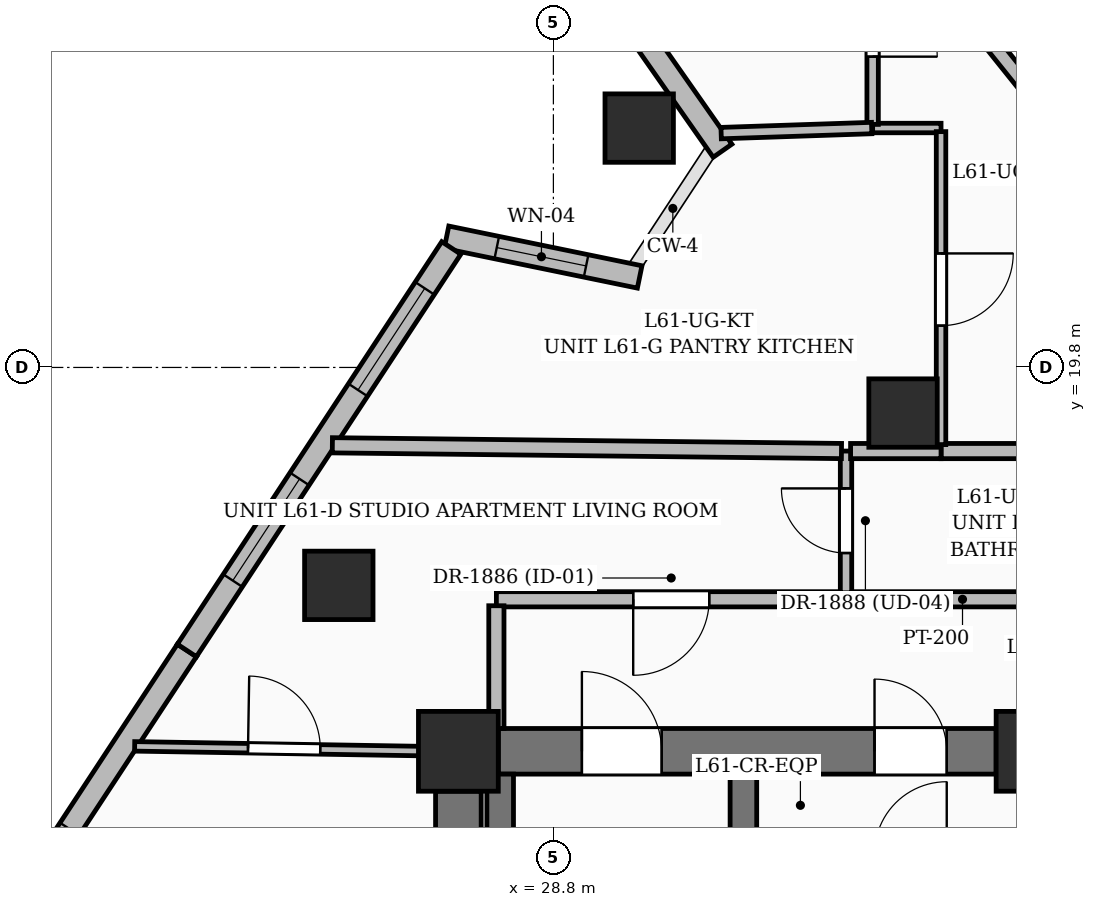
"""IFC4 building model, lengths in metres.
Left out: names, types, materials, properties, quantities, classifications, styles, units other than length and angle.
Written with IfcOpenShell. Run it as: python <this file> out.ifc"""

import sys

from ifc_helpers import new_model, si_unit, direction, frame, frame_2d, origin, origin_2d, place, context, subcontext, project, spatial, rectangle, extrude, element, fill, save


model = new_model("IFC4")
c1 = context("Model", 3, precision=1e-05, world=origin(), true_north=direction((0.0, 1.0)))
c2 = subcontext(c1, "Body", "Model", "MODEL_VIEW")
j1 = project(units=[si_unit("LENGTHUNIT", "METRE"), si_unit("PLANEANGLEUNIT", "RADIAN")], contexts=[c1])
p1 = place(None, origin())
s1 = spatial("IfcSite", under=j1, at=p1, CompositionType="ELEMENT")
p2 = place(p1, origin())
s2 = spatial("IfcBuilding", under=s1, at=p2, CompositionType="ELEMENT")
p3 = place(p2, frame((0.0, 0.0, 237.0)))
s3 = spatial("IfcBuildingStorey", under=s2, at=p3, CompositionType="ELEMENT", Elevation=237.0)
for number, where, z_axis, x_axis in (
    (1, (27.55, 14.75, 0.0), (0.0, 0.0, 1.0), (1.0, 0.0, 0.0)),
    (2, (35.15, 14.75, 0.0), (0.0, 0.0, 1.0), (1.0, 0.0, 0.0)),
):
    element("IfcColumn", number, at=place(p3, frame(where, z_axis=z_axis, x_axis=x_axis)), inside=s3, PredefinedType="COLUMN", context=c2, shape_type="SweptSolid", body=[
        extrude(rectangle(XDim=1.05, YDim=1.05, at=origin_2d()), origin(), (0.0, 0.0, 1.0), 3.75),
    ])
p4 = place(p3, frame((33.4, 19.2, 0.0), z_axis=(0.0, 0.0, 1.0), x_axis=(1.0, 0.0, 0.0)))
e3 = element("IfcColumn", 3, at=p4, inside=s3, PredefinedType="COLUMN", context=c2, shape_type="SweptSolid", body=[
    extrude(rectangle(XDim=0.9, YDim=0.9, at=origin_2d()), origin(), (0.0, 0.0, 1.0), 3.75),
])
p5 = place(p3, frame((28.075, 14.75, 0.0), z_axis=(0.0, 0.0, 1.0), x_axis=(1.0, 0.0, 0.0)))
e4 = element("IfcWall", 4, at=p5, inside=s3, PredefinedType="SHEAR", context=c2, shape_type="SweptSolid", body=[
    extrude(rectangle(XDim=6.55, YDim=0.6, at=frame_2d((3.275, 0.0))), origin(), (0.0, 0.0, 1.0), 3.75),
])
p6 = place(p5, frame((1.1, 0.0, 0.0)))
e5 = element("IfcOpeningElement", 5, at=p6, cuts=e4, PredefinedType="OPENING", context=c2, shape_type="SweptSolid", body=[
    extrude(rectangle(XDim=1.05, YDim=2.15, at=frame_2d((0.525, 1.075))), frame((0.0, 0.31, 0.0), z_axis=(0.0, -1.0, 0.0), x_axis=(1.0, 0.0, 0.0)), (0.0, 0.0, 1.0), 0.62),
])
p7 = place(p5, frame((4.95, 0.0, 0.0)))
e6 = element("IfcOpeningElement", 6, at=p7, cuts=e4, PredefinedType="OPENING", context=c2, shape_type="SweptSolid", body=[
    extrude(rectangle(XDim=0.95, YDim=2.15, at=frame_2d((0.475, 1.075))), frame((0.0, 0.31, 0.0), z_axis=(0.0, -1.0, 0.0), x_axis=(1.0, 0.0, 0.0)), (0.0, 0.0, 1.0), 0.62),
])
p8 = place(p3, frame((27.55, 5.075, 0.0), z_axis=(0.0, 0.0, 1.0), x_axis=(0.0, 1.0, 0.0)))
e7 = element("IfcWall", 7, at=p8, inside=s3, PredefinedType="SHEAR", context=c2, shape_type="SweptSolid", body=[
    extrude(rectangle(XDim=9.15, YDim=0.6, at=frame_2d((4.575, 0.0))), origin(), (0.0, 0.0, 1.0), 3.75),
])
p9 = place(p3, frame((28.1, 5.2, 0.0), z_axis=(0.0, 0.0, 1.0), x_axis=(0.0, 1.0, 0.0)))
e8 = element("IfcWall", 8, at=p9, inside=s3, PredefinedType="SOLIDWALL", context=c2, shape_type="SweptSolid", body=[
    extrude(rectangle(XDim=9.25, YDim=0.35, at=frame_2d((4.625, 0.0))), origin(), (0.0, 0.0, 1.0), 3.75),
])
p10 = place(p3, frame((31.3, 5.2, 0.0), z_axis=(0.0, 0.0, 1.0), x_axis=(0.0, 1.0, 0.0)))
e9 = element("IfcWall", 9, at=p10, inside=s3, PredefinedType="SOLIDWALL", context=c2, shape_type="SweptSolid", body=[
    extrude(rectangle(XDim=9.25, YDim=0.35, at=frame_2d((4.625, 0.0))), origin(), (0.0, 0.0, 1.0), 3.75),
])
p11 = place(p10, frame((6.02, 0.0, 0.0)))
e10 = element("IfcOpeningElement", 10, at=p11, cuts=e9, PredefinedType="OPENING", context=c2, shape_type="SweptSolid", body=[
    extrude(rectangle(XDim=1.0, YDim=2.15, at=frame_2d((0.5, 1.075))), frame((0.0, 0.185, 0.0), z_axis=(0.0, -1.0, 0.0), x_axis=(1.0, 0.0, 0.0)), (0.0, 0.0, 1.0), 0.37),
])
for number, where, z_axis, x_axis in (
    (11, (29.929, 22.949, 0.0), (0.0, 0.0, 1.0), (1.0, 0.0, 0.0)),
    (12, (25.977, 16.933, 0.0), (0.0, 0.0, 1.0), (1.0, 0.0, 0.0)),
):
    element("IfcColumn", number, at=place(p3, frame(where, z_axis=z_axis, x_axis=x_axis)), inside=s3, PredefinedType="COLUMN", context=c2, shape_type="SweptSolid", body=[
        extrude(rectangle(XDim=0.9, YDim=0.9, at=origin_2d()), origin(), (0.0, 0.0, 1.0), 3.75),
    ])
p12 = place(p3, frame((27.394, 21.513, 0.0), z_axis=(0.0, 0.0, 1.0), x_axis=(0.979513310411, -0.201379429751, 0.0)))
e13 = element("IfcWall", 13, at=p12, inside=s3, PredefinedType="SOLIDWALL", context=c2, shape_type="SweptSolid", body=[
    extrude(rectangle(XDim=2.594, YDim=0.3, at=frame_2d((1.297, 0.0))), origin(), (0.0, 0.0, 1.0), 2.825),
])
p13 = place(p12, frame((0.675, 0.0, 0.8)))
e14 = element("IfcOpeningElement", 14, at=p13, cuts=e13, PredefinedType="OPENING", context=c2, shape_type="SweptSolid", body=[
    extrude(rectangle(XDim=1.2, YDim=1.8, at=frame_2d((0.6, 0.9))), frame((0.0, 0.16, 0.0), z_axis=(0.0, -1.0, 0.0), x_axis=(1.0, 0.0, 0.0)), (0.0, 0.0, 1.0), 0.32),
])
p14 = place(p3, frame((31.025, 22.651, 0.0), z_axis=(0.0, 0.0, 1.0), x_axis=(-0.573670817112, 0.819085950065, 0.0)))
e15 = element("IfcWall", 15, at=p14, inside=s3, PredefinedType="SOLIDWALL", context=c2, shape_type="SweptSolid", body=[
    extrude(rectangle(XDim=2.594, YDim=0.3, at=frame_2d((1.297, 0.0))), origin(), (0.0, 0.0, 1.0), 2.825),
])
p15 = place(p3, frame((20.349, 10.551, 0.0), z_axis=(0.0, 0.0, 1.0), x_axis=(0.549037128291, 0.835797961087, 0.0)))
e16 = element("IfcWall", 16, at=p15, inside=s3, PredefinedType="SOLIDWALL", context=c2, shape_type="SweptSolid", body=[
    extrude(rectangle(XDim=6.611, YDim=0.3, at=frame_2d((3.305, 0.0))), origin(), (0.0, 0.0, 1.0), 3.5),
])
p16 = place(p15, frame((2.0, 0.0, 0.6)))
e17 = element("IfcOpeningElement", 17, at=p16, cuts=e16, PredefinedType="OPENING", context=c2, shape_type="SweptSolid", body=[
    extrude(rectangle(XDim=1.8, YDim=2.1, at=frame_2d((0.9, 1.05))), frame((0.0, 0.16, 0.0), z_axis=(0.0, -1.0, 0.0), x_axis=(1.0, 0.0, 0.0)), (0.0, 0.0, 1.0), 0.32),
])
p17 = place(p3, frame((23.978, 16.077, 0.0), z_axis=(0.0, 0.0, 1.0), x_axis=(0.549014101099, 0.835813087236, 0.0)))
e18 = element("IfcWall", 18, at=p17, inside=s3, PredefinedType="SOLIDWALL", context=c2, shape_type="SweptSolid", body=[
    extrude(rectangle(XDim=6.336, YDim=0.3, at=frame_2d((3.168, 0.0))), origin(), (0.0, 0.0, 1.0), 3.5),
])
p18 = place(p17, frame((1.1, 0.0, 0.55)))
e19 = element("IfcOpeningElement", 19, at=p18, cuts=e18, PredefinedType="OPENING", context=c2, shape_type="SweptSolid", body=[
    extrude(rectangle(XDim=1.6, YDim=2.2, at=frame_2d((0.8, 1.1))), frame((0.0, 0.16, 0.0), z_axis=(0.0, -1.0, 0.0), x_axis=(1.0, 0.0, 0.0)), (0.0, 0.0, 1.0), 0.32),
])
p19 = place(p17, frame((4.1, 0.0, 0.55)))
e20 = element("IfcOpeningElement", 20, at=p19, cuts=e18, PredefinedType="OPENING", context=c2, shape_type="SweptSolid", body=[
    extrude(rectangle(XDim=1.6, YDim=2.2, at=frame_2d((0.8, 1.1))), frame((0.0, 0.16, 0.0), z_axis=(0.0, -1.0, 0.0), x_axis=(1.0, 0.0, 0.0)), (0.0, 0.0, 1.0), 0.32),
])
p20 = place(p3, frame((34.72, 14.75, 0.0), z_axis=(0.0, 0.0, 1.0), x_axis=(1.0, 0.0, 0.0)))
e21 = element("IfcWall", 21, at=p20, inside=s3, PredefinedType="PARTITIONING", context=c2, shape_type="SweptSolid", body=[
    extrude(rectangle(XDim=1.03, YDim=0.2, at=frame_2d((0.515, 0.0))), origin(), (0.0, 0.0, 1.0), 2.685),
])
p21 = place(p3, frame((32.65, 16.75, 0.0), z_axis=(0.0, 0.0, 1.0), x_axis=(-1.0, 0.0, 0.0)))
e22 = element("IfcWall", 22, at=p21, inside=s3, PredefinedType="PARTITIONING", context=c2, shape_type="SweptSolid", body=[
    extrude(rectangle(XDim=4.6, YDim=0.2, at=frame_2d((2.3, 0.0))), origin(), (0.0, 0.0, 1.0), 3.16),
])
p22 = place(p21, frame((1.8, 0.0, 0.0)))
e23 = element("IfcOpeningElement", 23, at=p22, cuts=e22, PredefinedType="OPENING", context=c2, shape_type="SweptSolid", body=[
    extrude(rectangle(XDim=1.0, YDim=2.2, at=frame_2d((0.5, 1.1))), frame((0.0, 0.11, 0.0), z_axis=(0.0, -1.0, 0.0), x_axis=(1.0, 0.0, 0.0)), (0.0, 0.0, 1.0), 0.22),
])
p23 = place(p3, frame((28.05, 16.665, 0.0), z_axis=(0.0, 0.0, 1.0), x_axis=(0.0, -1.0, 0.0)))
e24 = element("IfcWall", 24, at=p23, inside=s3, PredefinedType="PARTITIONING", context=c2, shape_type="SweptSolid", body=[
    extrude(rectangle(XDim=1.615, YDim=0.2, at=frame_2d((0.808, 0.0))), origin(), (0.0, 0.0, 1.0), 3.16),
])
p24 = place(p3, frame((35.715, 16.75, 0.0), z_axis=(0.0, 0.0, 1.0), x_axis=(-1.0, 0.0, 0.0)))
e25 = element("IfcWall", 25, at=p24, inside=s3, PredefinedType="PARTITIONING", context=c2, shape_type="SweptSolid", body=[
    extrude(rectangle(XDim=3.065, YDim=0.2, at=frame_2d((1.533, 0.0))), origin(), (0.0, 0.0, 1.0), 2.685),
])
p25 = place(p3, frame((23.291, 14.815, 0.0), z_axis=(0.0, 0.0, 1.0), x_axis=(0.999865488885, -0.016401345587, 0.0)))
e26 = element("IfcWall", 26, at=p25, inside=s3, PredefinedType="PARTITIONING", context=c2, shape_type="SweptSolid", body=[
    extrude(rectangle(XDim=3.959, YDim=0.125, at=frame_2d((1.98, 0.0))), origin(), (0.0, 0.0, 1.0), 2.82),
])
p26 = place(p25, frame((1.492, 0.0, 0.0)))
e27 = element("IfcOpeningElement", 27, at=p26, cuts=e26, PredefinedType="OPENING", context=c2, shape_type="SweptSolid", body=[
    extrude(rectangle(XDim=0.95, YDim=2.2, at=frame_2d((0.475, 1.1))), frame((0.0, 0.072, 0.0), z_axis=(0.0, -1.0, 0.0), x_axis=(1.0, 0.0, 0.0)), (0.0, 0.0, 1.0), 0.145),
])
p27 = place(p3, frame((32.65, 16.835, 0.0), z_axis=(0.0, 0.0, 1.0), x_axis=(0.0, 1.0, 0.0)))
e28 = element("IfcWall", 28, at=p27, inside=s3, PredefinedType="PARTITIONING", context=c2, shape_type="SweptSolid", body=[
    extrude(rectangle(XDim=1.865, YDim=0.15, at=frame_2d((0.933, 0.0))), origin(), (0.0, 0.0, 1.0), 3.5),
])
p28 = place(p27, frame((0.524, 0.0, 0.0)))
e29 = element("IfcOpeningElement", 29, at=p28, cuts=e28, PredefinedType="OPENING", context=c2, shape_type="SweptSolid", body=[
    extrude(rectangle(XDim=0.85, YDim=2.1, at=frame_2d((0.425, 1.05))), frame((0.0, 0.085, 0.0), z_axis=(0.0, -1.0, 0.0), x_axis=(1.0, 0.0, 0.0)), (0.0, 0.0, 1.0), 0.17),
])
p29 = place(p3, frame((32.59, 18.7, 0.0), z_axis=(0.0, 0.0, 1.0), x_axis=(-0.999936578616, 0.011262270924, 0.0)))
e30 = element("IfcWall", 30, at=p29, inside=s3, PredefinedType="PARTITIONING", context=c2, shape_type="SweptSolid", body=[
    extrude(rectangle(XDim=6.698, YDim=0.2, at=frame_2d((3.349, 0.0))), origin(), (0.0, 0.0, 1.0), 2.82),
])
p30 = place(p3, frame((35.715, 18.7, 0.0), z_axis=(0.0, 0.0, 1.0), x_axis=(-1.0, 0.0, 0.0)))
e31 = element("IfcWall", 31, at=p30, inside=s3, PredefinedType="PARTITIONING", context=c2, shape_type="SweptSolid", body=[
    extrude(rectangle(XDim=1.815, YDim=0.2, at=frame_2d((0.908, 0.0))), origin(), (0.0, 0.0, 1.0), 3.5),
])
p31 = place(p3, frame((33.9, 18.7, 0.0), z_axis=(0.0, 0.0, 1.0), x_axis=(-1.0, 0.0, 0.0)))
e32 = element("IfcWall", 32, at=p31, inside=s3, PredefinedType="PARTITIONING", context=c2, shape_type="SweptSolid", body=[
    extrude(rectangle(XDim=1.19, YDim=0.2, at=frame_2d((0.595, 0.0))), origin(), (0.0, 0.0, 1.0), 2.685),
])
p32 = place(p3, frame((33.0, 22.95, 0.0), z_axis=(0.0, 0.0, 1.0), x_axis=(1.0, 0.0, 0.0)))
e33 = element("IfcWall", 33, at=p32, inside=s3, PredefinedType="PARTITIONING", context=c2, shape_type="SweptSolid", body=[
    extrude(rectangle(XDim=0.9, YDim=0.125, at=frame_2d((0.45, 0.0))), origin(), (0.0, 0.0, 1.0), 3.16),
])
p33 = place(p3, frame((33.9, 22.903, 0.0), z_axis=(0.0, 0.0, 1.0), x_axis=(0.0, -1.0, 0.0)))
e34 = element("IfcWall", 34, at=p33, inside=s3, PredefinedType="PARTITIONING", context=c2, shape_type="SweptSolid", body=[
    extrude(rectangle(XDim=4.118, YDim=0.125, at=frame_2d((2.059, 0.0))), origin(), (0.0, 0.0, 1.0), 2.685),
])
p34 = place(p33, frame((1.603, 0.0, 0.0)))
e35 = element("IfcOpeningElement", 35, at=p34, cuts=e34, PredefinedType="OPENING", context=c2, shape_type="SweptSolid", body=[
    extrude(rectangle(XDim=0.95, YDim=2.2, at=frame_2d((0.475, 1.1))), frame((0.0, 0.072, 0.0), z_axis=(0.0, -1.0, 0.0), x_axis=(1.0, 0.0, 0.0)), (0.0, 0.0, 1.0), 0.145),
])
p35 = place(p3, frame((33.0, 25.85, 0.0), z_axis=(0.0, 0.0, 1.0), x_axis=(0.0, -1.0, 0.0)))
e36 = element("IfcWall", 36, at=p35, inside=s3, PredefinedType="PARTITIONING", context=c2, shape_type="SweptSolid", body=[
    extrude(rectangle(XDim=2.853, YDim=0.15, at=frame_2d((1.426, 0.0))), origin(), (0.0, 0.0, 1.0), 3.16),
])
p36 = place(p35, frame((1.111, 0.0, 0.0)))
e37 = element("IfcOpeningElement", 37, at=p36, cuts=e36, PredefinedType="OPENING", context=c2, shape_type="SweptSolid", body=[
    extrude(rectangle(XDim=0.85, YDim=2.1, at=frame_2d((0.425, 1.05))), frame((0.0, 0.085, 0.0), z_axis=(0.0, -1.0, 0.0), x_axis=(1.0, 0.0, 0.0)), (0.0, 0.0, 1.0), 0.17),
])
p37 = place(p3, frame((35.747, 22.596, 0.0), z_axis=(0.0, 0.0, 1.0), x_axis=(-0.625774137293, 0.780004313511, 0.0)))
e38 = element("IfcWall", 38, at=p37, inside=s3, PredefinedType="PARTITIONING", context=c2, shape_type="SweptSolid", body=[
    extrude(rectangle(XDim=4.329, YDim=0.2, at=frame_2d((2.165, 0.0))), origin(), (0.0, 0.0, 1.0), 2.685),
])
p38 = place(p3, frame((32.988, 22.95, 0.0), z_axis=(0.0, 0.0, 1.0), x_axis=(-0.999434189894, -0.033634804468, 0.0)))
e39 = element("IfcWall", 39, at=p38, inside=s3, PredefinedType="PARTITIONING", context=c2, shape_type="SweptSolid", body=[
    extrude(rectangle(XDim=1.982, YDim=0.15, at=frame_2d((0.991, 0.0))), origin(), (0.0, 0.0, 1.0), 3.16),
])
p39 = place(p13, origin())
e40 = element("IfcWindow", 40, at=p39, inside=s3, PartitioningType="SINGLE_PANEL", PredefinedType="WINDOW", context=c2, shape_type="SweptSolid", body=[
    extrude(rectangle(XDim=1.2, YDim=1.8, at=frame_2d((0.6, 0.9))), frame((0.0, 0.03, 0.0), z_axis=(0.0, -1.0, 0.0), x_axis=(1.0, 0.0, 0.0)), (0.0, 0.0, 1.0), 0.06),
])
fill(e14, e40)
p40 = place(p18, origin())
e41 = element("IfcWindow", 41, at=p40, inside=s3, PartitioningType="SINGLE_PANEL", PredefinedType="WINDOW", context=c2, shape_type="SweptSolid", body=[
    extrude(rectangle(XDim=1.6, YDim=2.2, at=frame_2d((0.8, 1.1))), frame((0.0, 0.03, 0.0), z_axis=(0.0, -1.0, 0.0), x_axis=(1.0, 0.0, 0.0)), (0.0, 0.0, 1.0), 0.06),
])
fill(e19, e41)
p41 = place(p19, origin())
e42 = element("IfcWindow", 42, at=p41, inside=s3, PartitioningType="SINGLE_PANEL", PredefinedType="WINDOW", context=c2, shape_type="SweptSolid", body=[
    extrude(rectangle(XDim=1.6, YDim=2.2, at=frame_2d((0.8, 1.1))), frame((0.0, 0.03, 0.0), z_axis=(0.0, -1.0, 0.0), x_axis=(1.0, 0.0, 0.0)), (0.0, 0.0, 1.0), 0.06),
])
fill(e20, e42)
p42 = place(p6, origin())
e43 = element("IfcDoor", 43, at=p42, inside=s3, OperationType="SINGLE_SWING_LEFT", PredefinedType="DOOR", context=c2, shape_type="SweptSolid", body=[
    extrude(rectangle(XDim=1.05, YDim=2.15, at=frame_2d((0.525, 1.075))), frame((0.0, 0.025, 0.0), z_axis=(0.0, -1.0, 0.0), x_axis=(1.0, 0.0, 0.0)), (0.0, 0.0, 1.0), 0.05),
])
fill(e5, e43)
p43 = place(p7, origin())
e44 = element("IfcDoor", 44, at=p43, inside=s3, OperationType="SINGLE_SWING_LEFT", PredefinedType="DOOR", context=c2, shape_type="SweptSolid", body=[
    extrude(rectangle(XDim=0.95, YDim=2.15, at=frame_2d((0.475, 1.075))), frame((0.0, 0.025, 0.0), z_axis=(0.0, -1.0, 0.0), x_axis=(1.0, 0.0, 0.0)), (0.0, 0.0, 1.0), 0.05),
])
fill(e6, e44)
p44 = place(p22, origin())
e45 = element("IfcDoor", 45, at=p44, inside=s3, OperationType="SINGLE_SWING_RIGHT", PredefinedType="DOOR", context=c2, shape_type="SweptSolid", body=[
    extrude(rectangle(XDim=1.0, YDim=2.2, at=frame_2d((0.5, 1.1))), frame((0.0, 0.025, 0.0), z_axis=(0.0, -1.0, 0.0), x_axis=(1.0, 0.0, 0.0)), (0.0, 0.0, 1.0), 0.05),
])
fill(e23, e45)
p45 = place(p26, origin())
e46 = element("IfcDoor", 46, at=p45, inside=s3, OperationType="SINGLE_SWING_LEFT", PredefinedType="DOOR", context=c2, shape_type="SweptSolid", body=[
    extrude(rectangle(XDim=0.95, YDim=2.2, at=frame_2d((0.475, 1.1))), frame((0.0, 0.025, 0.0), z_axis=(0.0, -1.0, 0.0), x_axis=(1.0, 0.0, 0.0)), (0.0, 0.0, 1.0), 0.05),
])
fill(e27, e46)
p46 = place(p28, origin())
e47 = element("IfcDoor", 47, at=p46, inside=s3, OperationType="SINGLE_SWING_RIGHT", PredefinedType="DOOR", context=c2, shape_type="SweptSolid", body=[
    extrude(rectangle(XDim=0.85, YDim=2.1, at=frame_2d((0.425, 1.05))), frame((0.0, 0.025, 0.0), z_axis=(0.0, -1.0, 0.0), x_axis=(1.0, 0.0, 0.0)), (0.0, 0.0, 1.0), 0.05),
])
fill(e29, e47)
p47 = place(p34, origin())
e48 = element("IfcDoor", 48, at=p47, inside=s3, OperationType="SINGLE_SWING_LEFT", PredefinedType="DOOR", context=c2, shape_type="SweptSolid", body=[
    extrude(rectangle(XDim=0.95, YDim=2.2, at=frame_2d((0.475, 1.1))), frame((0.0, 0.025, 0.0), z_axis=(0.0, -1.0, 0.0), x_axis=(1.0, 0.0, 0.0)), (0.0, 0.0, 1.0), 0.05),
])
fill(e35, e48)
p48 = place(p36, origin())
e49 = element("IfcDoor", 49, at=p48, inside=s3, OperationType="SINGLE_SWING_RIGHT", PredefinedType="DOOR", context=c2, shape_type="SweptSolid", body=[
    extrude(rectangle(XDim=0.85, YDim=2.1, at=frame_2d((0.425, 1.05))), frame((0.0, 0.025, 0.0), z_axis=(0.0, -1.0, 0.0), x_axis=(1.0, 0.0, 0.0)), (0.0, 0.0, 1.0), 0.05),
])
fill(e37, e49)
save(model, sys.argv[1])
